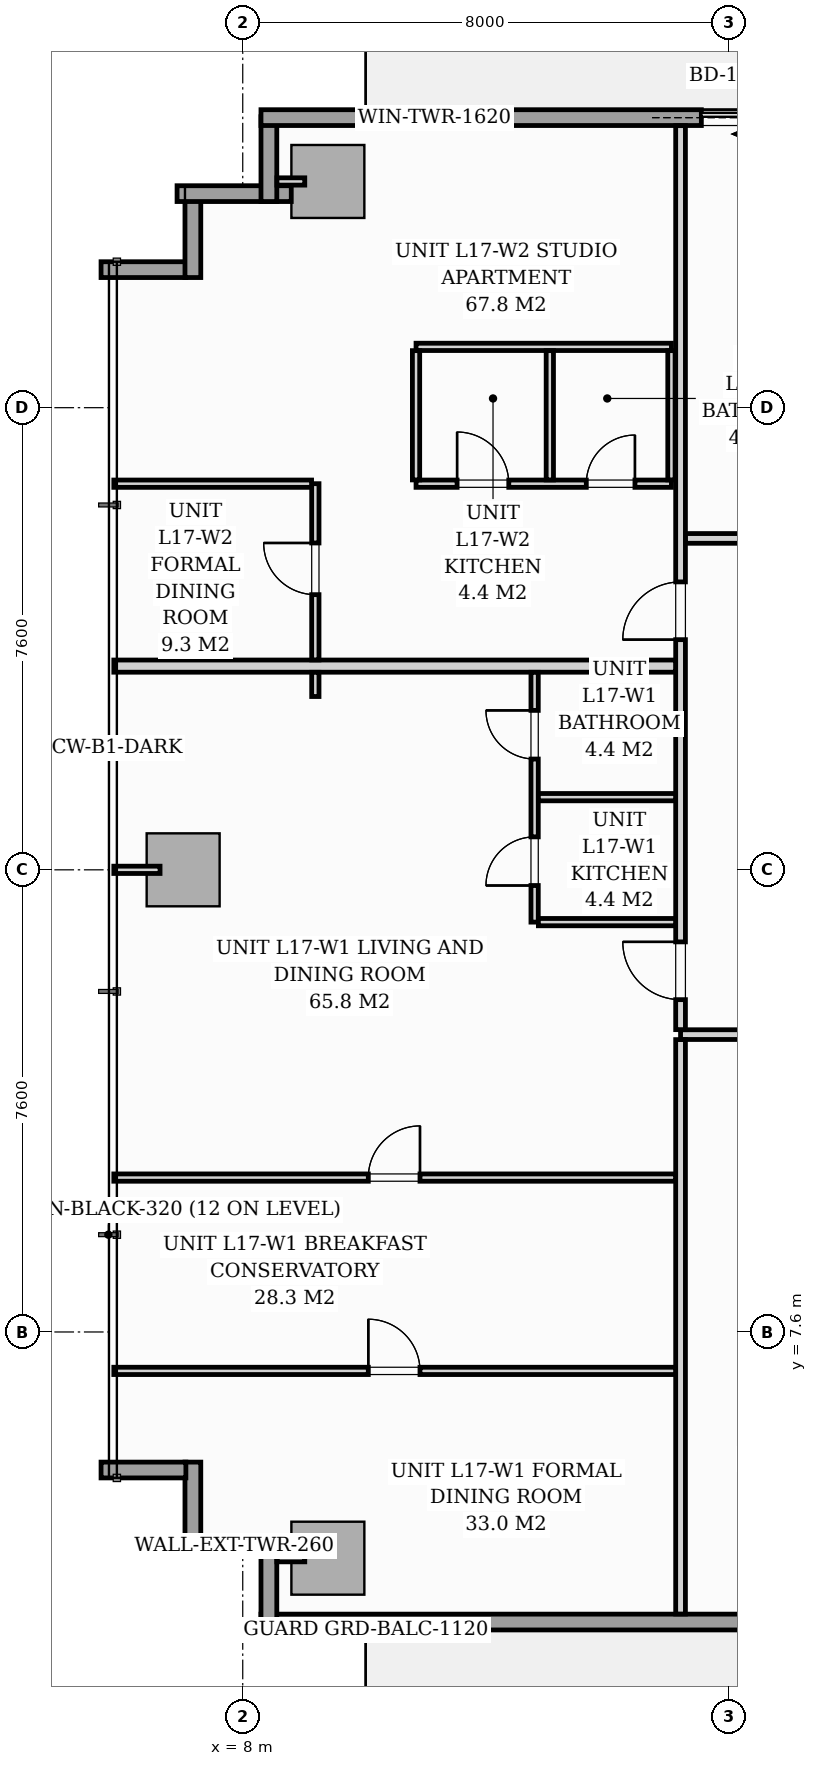
"""IFC4 building model, lengths in metres.
Left out: names, types, materials, properties, quantities, classifications, styles, units other than length and angle.
Written with IfcOpenShell. Run it as: python <this file> out.ifc"""

import sys

from ifc_helpers import new_model, si_unit, direction, frame, frame_2d, origin, origin_2d, place, context, subcontext, project, spatial, rectangle, extrude, source, transform, mapped, element, fill, save


model = new_model("IFC4")
c1 = context("Model", 3, precision=1e-05, world=origin(), true_north=direction((0.0, 1.0)))
c2 = subcontext(c1, "Body", "Model", "MODEL_VIEW")
j1 = project(units=[si_unit("LENGTHUNIT", "METRE"), si_unit("PLANEANGLEUNIT", "RADIAN")], contexts=[c1])
p1 = place(None, origin())
s1 = spatial("IfcSite", under=j1, at=p1, CompositionType="ELEMENT")
p2 = place(p1, origin())
s2 = spatial("IfcBuilding", under=s1, at=p2, CompositionType="ELEMENT")
p3 = place(p2, frame((0.0, 0.0, 61.4)))
s3 = spatial("IfcBuildingStorey", under=s2, at=p3, CompositionType="ELEMENT", Elevation=61.4)
m1 = source(origin(), c2, "Body", "SweptSolid", [
    extrude(rectangle(XDim=1.2, YDim=1.2, at=origin_2d()), origin(), (0.0, 0.0, 1.0), 3.196),
])
for number, where, z_axis, x_axis in (
    (1, (9.4, 3.88, 0.002), (0.0, 0.0, 1.0), (1.0, 0.0, 0.0)),
    (2, (9.4, 26.52, 0.002), (0.0, 0.0, 1.0), (1.0, 0.0, 0.0)),
    (3, (7.02, 15.2, 0.002), (0.0, 0.0, 1.0), (1.0, 0.0, 0.0)),
):
    element("IfcColumn", number, at=place(p3, frame(where, z_axis=z_axis, x_axis=x_axis)), inside=s3, PredefinedType="COLUMN", context=c2, shape_type="MappedRepresentation", body=[
        mapped(m1, transform((0.0, 0.0, 0.0), scale=1.0)),
    ])
p4 = place(p3, frame((8.798, 4.08, 0.0), z_axis=(0.0, 0.0, 1.0), x_axis=(-1.0, 0.0, 0.0)))
e4 = element("IfcWall", 4, at=p4, inside=s3, PredefinedType="STANDARD", context=c2, shape_type="SweptSolid", body=[
    extrude(rectangle(XDim=1.878, YDim=0.26, at=frame_2d((0.939, 0.0))), origin(), (0.0, 0.0, 1.0), 2.94),
])
for number, where, z_axis, x_axis in (
    (5, (7.18, 4.065, 0.0), (0.0, 0.0, 1.0), (0.0, 1.0, 0.0)),
    (6, (7.065, 5.33, 0.0), (0.0, 0.0, 1.0), (-1.0, 0.0, 0.0)),
    (7, (5.67, 25.07, 0.0), (0.0, 0.0, 1.0), (1.0, 0.0, 0.0)),
    (8, (7.18, 24.94, 0.0), (0.0, 0.0, 1.0), (0.0, 1.0, 0.0)),
):
    element("IfcWall", number, at=place(p3, frame(where, z_axis=z_axis, x_axis=x_axis)), inside=s3, PredefinedType="STANDARD", context=c2, shape_type="SweptSolid", body=[
        extrude(rectangle(XDim=1.395, YDim=0.26, at=frame_2d((0.698, 0.0))), origin(), (0.0, 0.0, 1.0), 2.94),
    ])
p5 = place(p3, frame((6.92, 26.32, 0.0), z_axis=(0.0, 0.0, 1.0), x_axis=(1.0, 0.0, 0.0)))
e9 = element("IfcWall", 9, at=p5, inside=s3, PredefinedType="STANDARD", context=c2, shape_type="SweptSolid", body=[
    extrude(rectangle(XDim=1.878, YDim=0.26, at=frame_2d((0.939, 0.0))), origin(), (0.0, 0.0, 1.0), 2.94),
])
p6 = place(p3, frame((8.43, 26.19, 0.0), z_axis=(0.0, 0.0, 1.0), x_axis=(0.0, 1.0, 0.0)))
e10 = element("IfcWall", 10, at=p6, inside=s3, PredefinedType="STANDARD", context=c2, shape_type="SweptSolid", body=[
    extrude(rectangle(XDim=1.395, YDim=0.26, at=frame_2d((0.698, 0.0))), origin(), (0.0, 0.0, 1.0), 2.94),
])
p7 = place(p3, frame((8.3, 27.57, 0.0), z_axis=(0.0, 0.0, 1.0), x_axis=(1.0, 0.0, 0.0)))
e11 = element("IfcWall", 11, at=p7, inside=s3, PredefinedType="STANDARD", context=c2, shape_type="SweptSolid", body=[
    extrude(rectangle(XDim=17.15, YDim=0.26, at=frame_2d((8.575, 0.0))), origin(), (0.0, 0.0, 1.0), 2.94),
])
p8 = place(p7, frame((7.242, 0.0, 0.0)))
e12 = element("IfcOpeningElement", 12, at=p8, cuts=e11, PredefinedType="OPENING", context=c2, shape_type="SweptSolid", body=[
    extrude(rectangle(XDim=1.8, YDim=2.06, at=frame_2d((0.9, 1.03))), frame((0.0, 0.14, 0.0), z_axis=(0.0, -1.0, 0.0), x_axis=(1.0, 0.0, 0.0)), (0.0, 0.0, 1.0), 0.28),
])
p9 = place(p7, frame((2.05, 0.0, 0.65)))
e13 = element("IfcOpeningElement", 13, at=p9, cuts=e11, PredefinedType="OPENING", context=c2, shape_type="SweptSolid", body=[
    extrude(rectangle(XDim=1.6, YDim=1.5, at=frame_2d((0.8, 0.75))), frame((0.0, 0.14, 0.0), z_axis=(0.0, -1.0, 0.0), x_axis=(1.0, 0.0, 0.0)), (0.0, 0.0, 1.0), 0.28),
])
p10 = place(p3, frame((25.45, 2.83, 0.0), z_axis=(0.0, 0.0, 1.0), x_axis=(-1.0, 0.0, 0.0)))
e14 = element("IfcWall", 14, at=p10, inside=s3, PredefinedType="STANDARD", context=c2, shape_type="SweptSolid", body=[
    extrude(rectangle(XDim=17.15, YDim=0.26, at=frame_2d((8.575, 0.0))), origin(), (0.0, 0.0, 1.0), 2.94),
])
p11 = place(p10, frame((6.93, 0.0, 0.0)))
e15 = element("IfcOpeningElement", 15, at=p11, cuts=e14, PredefinedType="OPENING", context=c2, shape_type="SweptSolid", body=[
    extrude(rectangle(XDim=1.8, YDim=2.06, at=frame_2d((0.9, 1.03))), frame((0.0, 0.14, 0.0), z_axis=(0.0, -1.0, 0.0), x_axis=(1.0, 0.0, 0.0)), (0.0, 0.0, 1.0), 0.28),
])
p12 = place(p10, frame((0.7, 0.0, 0.65)))
e16 = element("IfcOpeningElement", 16, at=p12, cuts=e14, PredefinedType="OPENING", context=c2, shape_type="SweptSolid", body=[
    extrude(rectangle(XDim=1.6, YDim=1.5, at=frame_2d((0.8, 0.75))), frame((0.0, 0.14, 0.0), z_axis=(0.0, -1.0, 0.0), x_axis=(1.0, 0.0, 0.0)), (0.0, 0.0, 1.0), 0.28),
])
p13 = place(p3, frame((8.43, 2.815, 0.0), z_axis=(0.0, 0.0, 1.0), x_axis=(0.0, 1.0, 0.0)))
e17 = element("IfcWall", 17, at=p13, inside=s3, PredefinedType="STANDARD", context=c2, shape_type="SweptSolid", body=[
    extrude(rectangle(XDim=1.395, YDim=0.26, at=frame_2d((0.698, 0.0))), origin(), (0.0, 0.0, 1.0), 2.94),
])
p14 = place(p3, frame((15.2, 12.49, 0.0), z_axis=(0.0, 0.0, 1.0), x_axis=(1.0, 0.0, 0.0)))
e18 = element("IfcWall", 18, at=p14, inside=s3, PredefinedType="PARTITIONING", context=c2, shape_type="SweptSolid", body=[
    extrude(rectangle(XDim=37.1, YDim=0.16, at=frame_2d((18.55, 0.0))), origin(), (0.0, 0.0, 1.0), 2.94),
])
p15 = place(p14, frame((5.863, 0.0, 0.0)))
e19 = element("IfcOpeningElement", 19, at=p15, cuts=e18, PredefinedType="OPENING", context=c2, shape_type="SweptSolid", body=[
    extrude(rectangle(XDim=0.95, YDim=2.06, at=frame_2d((0.475, 1.03))), frame((0.0, 0.09, 0.0), z_axis=(0.0, -1.0, 0.0), x_axis=(1.0, 0.0, 0.0)), (0.0, 0.0, 1.0), 0.18),
])
p16 = place(p14, frame((18.25, 0.0, 0.0)))
e20 = element("IfcOpeningElement", 20, at=p16, cuts=e18, PredefinedType="OPENING", context=c2, shape_type="SweptSolid", body=[
    extrude(rectangle(XDim=0.95, YDim=2.06, at=frame_2d((0.475, 1.03))), frame((0.0, 0.09, 0.0), z_axis=(0.0, -1.0, 0.0), x_axis=(1.0, 0.0, 0.0)), (0.0, 0.0, 1.0), 0.18),
])
p17 = place(p14, frame((30.63, 0.0, 0.0)))
e21 = element("IfcOpeningElement", 21, at=p17, cuts=e18, PredefinedType="OPENING", context=c2, shape_type="SweptSolid", body=[
    extrude(rectangle(XDim=0.95, YDim=2.06, at=frame_2d((0.475, 1.03))), frame((0.0, 0.09, 0.0), z_axis=(0.0, -1.0, 0.0), x_axis=(1.0, 0.0, 0.0)), (0.0, 0.0, 1.0), 0.18),
])
p18 = place(p3, frame((15.2, 2.962, 0.0), z_axis=(0.0, 0.0, 1.0), x_axis=(0.0, 1.0, 0.0)))
e22 = element("IfcWall", 22, at=p18, inside=s3, PredefinedType="PARTITIONING", context=c2, shape_type="SweptSolid", body=[
    extrude(rectangle(XDim=9.446, YDim=0.16, at=frame_2d((4.723, 0.0))), origin(), (0.0, 0.0, 1.0), 2.94),
])
p19 = place(p3, frame((15.2, 12.572, 0.0), z_axis=(0.0, 0.0, 1.0), x_axis=(0.0, 1.0, 0.0)))
e23 = element("IfcWall", 23, at=p19, inside=s3, PredefinedType="PARTITIONING", context=c2, shape_type="SweptSolid", body=[
    extrude(rectangle(XDim=14.866, YDim=0.16, at=frame_2d((7.433, 0.0))), origin(), (0.0, 0.0, 1.0), 2.94),
])
p20 = place(p19, frame((0.493, 0.0, 0.0)))
e24 = element("IfcOpeningElement", 24, at=p20, cuts=e23, PredefinedType="OPENING", context=c2, shape_type="SweptSolid", body=[
    extrude(rectangle(XDim=0.95, YDim=2.06, at=frame_2d((0.475, 1.03))), frame((0.0, 0.09, 0.0), z_axis=(0.0, -1.0, 0.0), x_axis=(1.0, 0.0, 0.0)), (0.0, 0.0, 1.0), 0.18),
])
p21 = place(p19, frame((6.413, 0.0, 0.0)))
e25 = element("IfcOpeningElement", 25, at=p21, cuts=e23, PredefinedType="OPENING", context=c2, shape_type="SweptSolid", body=[
    extrude(rectangle(XDim=0.95, YDim=2.06, at=frame_2d((0.475, 1.03))), frame((0.0, 0.09, 0.0), z_axis=(0.0, -1.0, 0.0), x_axis=(1.0, 0.0, 0.0)), (0.0, 0.0, 1.0), 0.18),
])
p22 = place(p3, frame((5.88, 18.55, 0.0), z_axis=(0.0, 0.0, 1.0), x_axis=(1.0, 0.0, 0.0)))
e26 = element("IfcWall", 26, at=p22, inside=s3, PredefinedType="PARTITIONING", context=c2, shape_type="SweptSolid", body=[
    extrude(rectangle(XDim=9.238, YDim=0.2, at=frame_2d((4.619, 0.0))), origin(), (0.0, 0.0, 1.0), 2.94),
])
p23 = place(p3, frame((12.8, 14.34, 0.0), z_axis=(0.0, 0.0, 1.0), x_axis=(0.0, 1.0, 0.0)))
e27 = element("IfcWall", 27, at=p23, inside=s3, PredefinedType="PARTITIONING", context=c2, shape_type="SweptSolid", body=[
    extrude(rectangle(XDim=4.108, YDim=0.12, at=frame_2d((2.054, 0.0))), origin(), (0.0, 0.0, 1.0), 2.94),
])
p24 = place(p23, frame((0.602, 0.0, 0.0)))
e28 = element("IfcOpeningElement", 28, at=p24, cuts=e27, PredefinedType="OPENING", context=c2, shape_type="SweptSolid", body=[
    extrude(rectangle(XDim=0.8, YDim=2.0, at=frame_2d((0.4, 1.0))), frame((0.0, 0.07, 0.0), z_axis=(0.0, -1.0, 0.0), x_axis=(1.0, 0.0, 0.0)), (0.0, 0.0, 1.0), 0.14),
])
p25 = place(p23, frame((2.682, 0.0, 0.0)))
e29 = element("IfcOpeningElement", 29, at=p25, cuts=e27, PredefinedType="OPENING", context=c2, shape_type="SweptSolid", body=[
    extrude(rectangle(XDim=0.8, YDim=2.02, at=frame_2d((0.4, 1.01))), frame((0.0, 0.07, 0.0), z_axis=(0.0, -1.0, 0.0), x_axis=(1.0, 0.0, 0.0)), (0.0, 0.0, 1.0), 0.14),
])
for number, where, z_axis, x_axis in (
    (30, (12.862, 16.395, 0.0), (0.0, 0.0, 1.0), (1.0, 0.0, 0.0)),
    (31, (12.862, 14.34, 0.0), (0.0, 0.0, 1.0), (1.0, 0.0, 0.0)),
):
    element("IfcWall", number, at=place(p3, frame(where, z_axis=z_axis, x_axis=x_axis)), inside=s3, PredefinedType="PARTITIONING", context=c2, shape_type="SweptSolid", body=[
        extrude(rectangle(XDim=2.256, YDim=0.12, at=frame_2d((1.128, 0.0))), origin(), (0.0, 0.0, 1.0), 2.94),
    ])
p26 = place(p3, frame((5.88, 6.96, 0.0), z_axis=(0.0, 0.0, 1.0), x_axis=(1.0, 0.0, 0.0)))
e32 = element("IfcWall", 32, at=p26, inside=s3, PredefinedType="PARTITIONING", context=c2, shape_type="SweptSolid", body=[
    extrude(rectangle(XDim=9.238, YDim=0.12, at=frame_2d((4.619, 0.0))), origin(), (0.0, 0.0, 1.0), 2.94),
])
p27 = place(p26, frame((4.185, 0.0, 0.0)))
e33 = element("IfcOpeningElement", 33, at=p27, cuts=e32, PredefinedType="OPENING", context=c2, shape_type="SweptSolid", body=[
    extrude(rectangle(XDim=0.85, YDim=2.05, at=frame_2d((0.425, 1.025))), frame((0.0, 0.07, 0.0), z_axis=(0.0, -1.0, 0.0), x_axis=(1.0, 0.0, 0.0)), (0.0, 0.0, 1.0), 0.14),
])
p28 = place(p3, frame((5.88, 10.139, 0.0), z_axis=(0.0, 0.0, 1.0), x_axis=(1.0, 0.0, 0.0)))
e34 = element("IfcWall", 34, at=p28, inside=s3, PredefinedType="PARTITIONING", context=c2, shape_type="SweptSolid", body=[
    extrude(rectangle(XDim=9.238, YDim=0.12, at=frame_2d((4.619, 0.0))), origin(), (0.0, 0.0, 1.0), 2.94),
])
p29 = place(p28, frame((4.185, 0.0, 0.0)))
e35 = element("IfcOpeningElement", 35, at=p29, cuts=e34, PredefinedType="OPENING", context=c2, shape_type="SweptSolid", body=[
    extrude(rectangle(XDim=0.85, YDim=2.05, at=frame_2d((0.425, 1.025))), frame((0.0, 0.07, 0.0), z_axis=(0.0, -1.0, 0.0), x_axis=(1.0, 0.0, 0.0)), (0.0, 0.0, 1.0), 0.14),
])
p30 = place(p3, frame((10.85, 21.55, 0.0), z_axis=(0.0, 0.0, 1.0), x_axis=(1.0, 0.0, 0.0)))
e36 = element("IfcWall", 36, at=p30, inside=s3, PredefinedType="PARTITIONING", context=c2, shape_type="SweptSolid", body=[
    extrude(rectangle(XDim=4.2, YDim=0.12, at=frame_2d((2.1, 0.0))), origin(), (0.0, 0.0, 1.0), 2.94),
])
p31 = place(p30, frame((0.675, 0.0, 0.0)))
e37 = element("IfcOpeningElement", 37, at=p31, cuts=e36, PredefinedType="OPENING", context=c2, shape_type="SweptSolid", body=[
    extrude(rectangle(XDim=0.85, YDim=2.05, at=frame_2d((0.425, 1.025))), frame((0.0, 0.07, 0.0), z_axis=(0.0, -1.0, 0.0), x_axis=(1.0, 0.0, 0.0)), (0.0, 0.0, 1.0), 0.14),
])
p32 = place(p30, frame((2.8, 0.0, 0.0)))
e38 = element("IfcOpeningElement", 38, at=p32, cuts=e36, PredefinedType="OPENING", context=c2, shape_type="SweptSolid", body=[
    extrude(rectangle(XDim=0.8, YDim=2.02, at=frame_2d((0.4, 1.01))), frame((0.0, 0.07, 0.0), z_axis=(0.0, -1.0, 0.0), x_axis=(1.0, 0.0, 0.0)), (0.0, 0.0, 1.0), 0.14),
])
p33 = place(p3, frame((10.85, 23.8, 0.0), z_axis=(0.0, 0.0, 1.0), x_axis=(1.0, 0.0, 0.0)))
e39 = element("IfcWall", 39, at=p33, inside=s3, PredefinedType="PARTITIONING", context=c2, shape_type="SweptSolid", body=[
    extrude(rectangle(XDim=4.2, YDim=0.12, at=frame_2d((2.1, 0.0))), origin(), (0.0, 0.0, 1.0), 2.94),
])
for number, where, z_axis, x_axis in (
    (40, (10.85, 21.612, 0.0), (0.0, 0.0, 1.0), (0.0, 1.0, 0.0)),
    (41, (13.05, 21.612, 0.0), (0.0, 0.0, 1.0), (0.0, 1.0, 0.0)),
    (42, (15.05, 21.612, 0.0), (0.0, 0.0, 1.0), (0.0, 1.0, 0.0)),
):
    element("IfcWall", number, at=place(p3, frame(where, z_axis=z_axis, x_axis=x_axis)), inside=s3, PredefinedType="PARTITIONING", context=c2, shape_type="SweptSolid", body=[
        extrude(rectangle(XDim=2.126, YDim=0.12, at=frame_2d((1.063, 0.0))), origin(), (0.0, 0.0, 1.0), 2.94),
    ])
p34 = place(p3, frame((9.194, 18.05, 0.0), z_axis=(0.0, 0.0, 1.0), x_axis=(0.0, 1.0, 0.0)))
e43 = element("IfcWall", 43, at=p34, inside=s3, PredefinedType="PARTITIONING", context=c2, shape_type="SweptSolid", body=[
    extrude(rectangle(XDim=0.398, YDim=0.12, at=frame_2d((0.199, 0.0))), origin(), (0.0, 0.0, 1.0), 2.94),
])
p35 = place(p3, frame((9.194, 18.652, 0.0), z_axis=(0.0, 0.0, 1.0), x_axis=(0.0, 1.0, 0.0)))
e44 = element("IfcWall", 44, at=p35, inside=s3, PredefinedType="PARTITIONING", context=c2, shape_type="SweptSolid", body=[
    extrude(rectangle(XDim=2.898, YDim=0.12, at=frame_2d((1.449, 0.0))), origin(), (0.0, 0.0, 1.0), 2.94),
])
p36 = place(p35, frame((1.073, 0.0, 0.0)))
e45 = element("IfcOpeningElement", 45, at=p36, cuts=e44, PredefinedType="OPENING", context=c2, shape_type="SweptSolid", body=[
    extrude(rectangle(XDim=0.85, YDim=2.05, at=frame_2d((0.425, 1.025))), frame((0.0, 0.07, 0.0), z_axis=(0.0, -1.0, 0.0), x_axis=(1.0, 0.0, 0.0)), (0.0, 0.0, 1.0), 0.14),
])
p37 = place(p3, frame((5.88, 21.55, 0.0), z_axis=(0.0, 0.0, 1.0), x_axis=(1.0, 0.0, 0.0)))
e46 = element("IfcWall", 46, at=p37, inside=s3, PredefinedType="PARTITIONING", context=c2, shape_type="SweptSolid", body=[
    extrude(rectangle(XDim=3.252, YDim=0.12, at=frame_2d((1.626, 0.0))), origin(), (0.0, 0.0, 1.0), 2.94),
])
p38 = place(p3, frame((15.282, 20.65, 0.0), z_axis=(0.0, 0.0, 1.0), x_axis=(1.0, 0.0, 0.0)))
e47 = element("IfcWall", 47, at=p38, inside=s3, PredefinedType="PARTITIONING", context=c2, shape_type="SweptSolid", body=[
    extrude(rectangle(XDim=1.786, YDim=0.16, at=frame_2d((0.893, 0.0))), origin(), (0.0, 0.0, 1.0), 2.94),
])
for number, where, z_axis, x_axis in (
    (48, (9.02, 3.88, 0.0), (0.0, 0.0, 1.0), (-1.0, 0.0, 0.0)),
    (49, (9.02, 26.52, 0.0), (0.0, 0.0, 1.0), (-1.0, 0.0, 0.0)),
):
    element("IfcWall", number, at=place(p3, frame(where, z_axis=z_axis, x_axis=x_axis)), inside=s3, PredefinedType="PARTITIONING", context=c2, shape_type="SweptSolid", body=[
        extrude(rectangle(XDim=0.458, YDim=0.12, at=frame_2d((0.229, 0.0))), origin(), (0.0, 0.0, 1.0), 2.94),
    ])
p39 = place(p3, frame((6.64, 15.2, 0.0), z_axis=(0.0, 0.0, 1.0), x_axis=(-1.0, 0.0, 0.0)))
e50 = element("IfcWall", 50, at=p39, inside=s3, PredefinedType="PARTITIONING", context=c2, shape_type="SweptSolid", body=[
    extrude(rectangle(XDim=0.76, YDim=0.12, at=frame_2d((0.38, 0.0))), origin(), (0.0, 0.0, 1.0), 2.94),
])
m2 = source(origin(), c2, "Body", "SweptSolid", [
    extrude(rectangle(XDim=1.8, YDim=2.06, at=frame_2d((0.9, 1.03))), frame((0.0, 0.025, 0.0), z_axis=(0.0, -1.0, 0.0), x_axis=(1.0, 0.0, 0.0)), (0.0, 0.0, 1.0), 0.05),
])
p40 = place(p8, origin())
e51 = element("IfcDoor", 51, at=p40, inside=s3, OperationType="SLIDING_TO_LEFT", PredefinedType="DOOR", context=c2, shape_type="MappedRepresentation", body=[
    mapped(m2, transform((0.0, 0.0, 0.0), scale=1.0)),
])
fill(e12, e51)
m3 = source(origin(), c2, "Body", "SweptSolid", [
    extrude(rectangle(XDim=1.6, YDim=1.5, at=frame_2d((0.8, 0.75))), frame((0.0, 0.03, 0.0), z_axis=(0.0, -1.0, 0.0), x_axis=(1.0, 0.0, 0.0)), (0.0, 0.0, 1.0), 0.06),
])
p41 = place(p9, origin())
e52 = element("IfcWindow", 52, at=p41, inside=s3, PartitioningType="SINGLE_PANEL", PredefinedType="WINDOW", context=c2, shape_type="MappedRepresentation", body=[
    mapped(m3, transform((0.0, 0.0, 0.0), scale=1.0)),
])
fill(e13, e52)
m4 = source(origin(), c2, "Body", "SweptSolid", [
    extrude(rectangle(XDim=0.95, YDim=2.06, at=frame_2d((0.475, 1.03))), frame((0.0, 0.025, 0.0), z_axis=(0.0, -1.0, 0.0), x_axis=(1.0, 0.0, 0.0)), (0.0, 0.0, 1.0), 0.05),
])
p42 = place(p20, origin())
e53 = element("IfcDoor", 53, at=p42, inside=s3, OperationType="SINGLE_SWING_RIGHT", PredefinedType="DOOR", context=c2, shape_type="MappedRepresentation", body=[
    mapped(m4, transform((0.0, 0.0, 0.0), scale=1.0)),
])
fill(e24, e53)
m5 = source(origin(), c2, "Body", "SweptSolid", [
    extrude(rectangle(XDim=0.8, YDim=2.0, at=frame_2d((0.4, 1.0))), frame((0.0, 0.025, 0.0), z_axis=(0.0, -1.0, 0.0), x_axis=(1.0, 0.0, 0.0)), (0.0, 0.0, 1.0), 0.05),
])
p43 = place(p24, origin())
e54 = element("IfcDoor", 54, at=p43, inside=s3, OperationType="SINGLE_SWING_LEFT", PredefinedType="DOOR", context=c2, shape_type="MappedRepresentation", body=[
    mapped(m5, transform((0.0, 0.0, 0.0), scale=1.0)),
])
fill(e28, e54)
m6 = source(origin(), c2, "Body", "SweptSolid", [
    extrude(rectangle(XDim=0.8, YDim=2.02, at=frame_2d((0.4, 1.01))), frame((0.0, 0.025, 0.0), z_axis=(0.0, -1.0, 0.0), x_axis=(1.0, 0.0, 0.0)), (0.0, 0.0, 1.0), 0.05),
])
p44 = place(p25, origin())
e55 = element("IfcDoor", 55, at=p44, inside=s3, OperationType="SINGLE_SWING_RIGHT", PredefinedType="DOOR", context=c2, shape_type="MappedRepresentation", body=[
    mapped(m6, transform((0.0, 0.0, 0.0), scale=1.0)),
])
fill(e29, e55)
m7 = source(origin(), c2, "Body", "SweptSolid", [
    extrude(rectangle(XDim=0.85, YDim=2.05, at=frame_2d((0.425, 1.025))), frame((0.0, 0.025, 0.0), z_axis=(0.0, -1.0, 0.0), x_axis=(1.0, 0.0, 0.0)), (0.0, 0.0, 1.0), 0.05),
])
p45 = place(p27, origin())
e56 = element("IfcDoor", 56, at=p45, inside=s3, OperationType="SINGLE_SWING_LEFT", PredefinedType="DOOR", context=c2, shape_type="MappedRepresentation", body=[
    mapped(m7, transform((0.0, 0.0, 0.0), scale=1.0)),
])
fill(e33, e56)
p46 = place(p29, origin())
e57 = element("IfcDoor", 57, at=p46, inside=s3, OperationType="SINGLE_SWING_RIGHT", PredefinedType="DOOR", context=c2, shape_type="MappedRepresentation", body=[
    mapped(m7, transform((0.0, 0.0, 0.0), scale=1.0)),
])
fill(e35, e57)
p47 = place(p21, origin())
e58 = element("IfcDoor", 58, at=p47, inside=s3, OperationType="SINGLE_SWING_LEFT", PredefinedType="DOOR", context=c2, shape_type="MappedRepresentation", body=[
    mapped(m4, transform((0.0, 0.0, 0.0), scale=1.0)),
])
fill(e25, e58)
p48 = place(p36, origin())
e59 = element("IfcDoor", 59, at=p48, inside=s3, OperationType="SINGLE_SWING_RIGHT", PredefinedType="DOOR", context=c2, shape_type="MappedRepresentation", body=[
    mapped(m7, transform((0.0, 0.0, 0.0), scale=1.0)),
])
fill(e45, e59)
p49 = place(p31, origin())
e60 = element("IfcDoor", 60, at=p49, inside=s3, OperationType="SINGLE_SWING_LEFT", PredefinedType="DOOR", context=c2, shape_type="MappedRepresentation", body=[
    mapped(m7, transform((0.0, 0.0, 0.0), scale=1.0)),
])
fill(e37, e60)
p50 = place(p32, origin())
e61 = element("IfcDoor", 61, at=p50, inside=s3, OperationType="SINGLE_SWING_RIGHT", PredefinedType="DOOR", context=c2, shape_type="MappedRepresentation", body=[
    mapped(m6, transform((0.0, 0.0, 0.0), scale=1.0)),
])
fill(e38, e61)
save(model, sys.argv[1])
